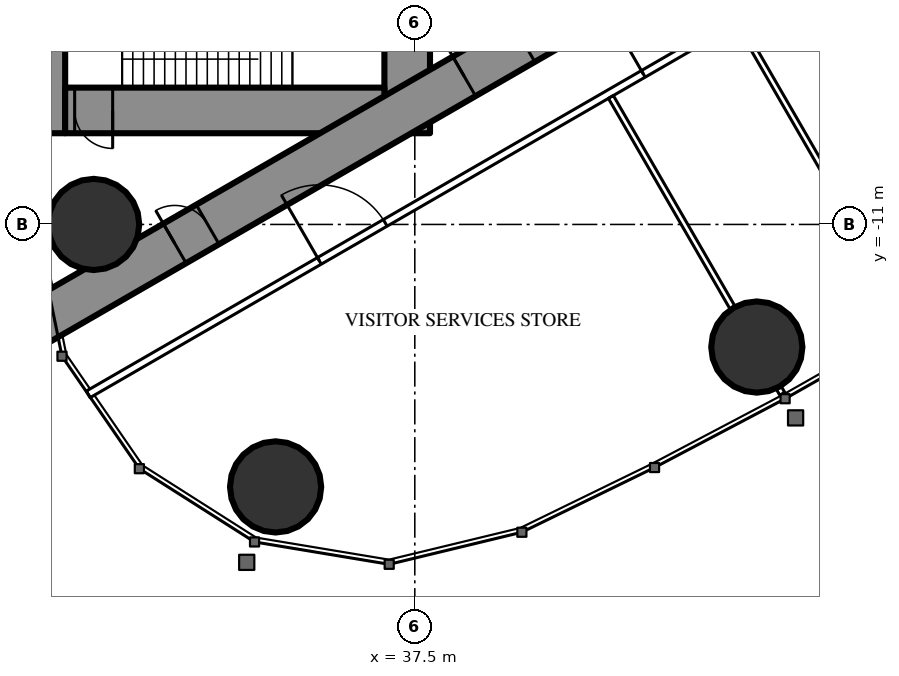
"""IFC4 building model, lengths in metres.
Left out: names, types, materials, properties, quantities, classifications, styles, units other than length and angle.
Written with IfcOpenShell. Run it as: python <this file> out.ifc"""

import sys

from ifc_helpers import new_model, si_unit, direction, frame, frame_2d, origin, origin_2d, place, context, subcontext, project, spatial, rectangle, circle, extrude, element, fill, save


model = new_model("IFC4")
c1 = context("Model", 3, precision=1e-05, world=origin(), true_north=direction((0.0, 1.0)))
c2 = subcontext(c1, "Body", "Model", "MODEL_VIEW")
j1 = project(units=[si_unit("LENGTHUNIT", "METRE"), si_unit("PLANEANGLEUNIT", "RADIAN")], contexts=[c1])
p1 = place(None, origin())
s1 = spatial("IfcSite", under=j1, at=p1, CompositionType="ELEMENT")
p2 = place(p1, origin())
s2 = spatial("IfcBuilding", under=s1, at=p2, CompositionType="ELEMENT")
p3 = place(p2, frame((0.0, 0.0, 257.3)))
s3 = spatial("IfcBuildingStorey", under=s2, at=p3, CompositionType="ELEMENT", Elevation=257.3)
for number, where, z_axis, x_axis in (
    (1, (33.837, -17.906, 0.0), (0.0, 0.0, 1.0), (1.0, 0.0, 0.0)),
    (2, (29.05, -11.0, 0.0), (0.0, 0.0, 1.0), (1.0, 0.0, 0.0)),
    (3, (46.499, -14.226, 0.0), (0.0, 0.0, 1.0), (1.0, 0.0, 0.0)),
):
    element("IfcColumn", number, at=place(p3, frame(where, z_axis=z_axis, x_axis=x_axis)), inside=s3, PredefinedType="COLUMN", context=c2, shape_type="SweptSolid", body=[
        extrude(circle(Radius=1.2, at=origin_2d()), origin(), (0.0, 0.0, 1.0), 6.0),
    ])
p4 = place(p3, frame((27.9, -8.6, 0.0), z_axis=(0.0, 0.0, 1.0), x_axis=(0.0, 1.0, 0.0)))
e4 = element("IfcWall", 4, at=p4, inside=s3, PredefinedType="SHEAR", context=c2, shape_type="SweptSolid", body=[
    extrude(rectangle(XDim=17.2, YDim=0.8, at=frame_2d((8.6, 0.0))), origin(), (0.0, 0.0, 1.0), 6.0),
])
p5 = place(p4, frame((9.35, 0.0, 0.0)))
e5 = element("IfcOpeningElement", 5, at=p5, cuts=e4, PredefinedType="OPENING", context=c2, shape_type="SweptSolid", body=[
    extrude(rectangle(XDim=0.9, YDim=2.2, at=frame_2d((0.45, 1.1))), frame((0.0, 0.41, 0.0), z_axis=(0.0, -1.0, 0.0), x_axis=(1.0, 0.0, 0.0)), (0.0, 0.0, 1.0), 0.82),
])
p6 = place(p3, frame((37.3, -8.6, 0.0), z_axis=(0.0, 0.0, 1.0), x_axis=(0.0, 1.0, 0.0)))
e6 = element("IfcWall", 6, at=p6, inside=s3, PredefinedType="SHEAR", context=c2, shape_type="SweptSolid", body=[
    extrude(rectangle(XDim=17.2, YDim=1.2, at=frame_2d((8.6, 0.0))), origin(), (0.0, 0.0, 1.0), 6.0),
])
p7 = place(p6, frame((7.7, 0.0, 0.0)))
e7 = element("IfcOpeningElement", 7, at=p7, cuts=e6, PredefinedType="OPENING", context=c2, shape_type="SweptSolid", body=[
    extrude(rectangle(XDim=1.8, YDim=2.2, at=frame_2d((0.9, 1.1))), frame((0.0, 0.61, 0.0), z_axis=(0.0, -1.0, 0.0), x_axis=(1.0, 0.0, 0.0)), (0.0, 0.0, 1.0), 1.22),
])
p8 = place(p3, frame((28.3, -8.0, 0.0), z_axis=(0.0, 0.0, 1.0), x_axis=(1.0, 0.0, 0.0)))
e8 = element("IfcWall", 8, at=p8, inside=s3, PredefinedType="SHEAR", context=c2, shape_type="SweptSolid", body=[
    extrude(rectangle(XDim=8.4, YDim=1.2, at=frame_2d((4.2, 0.0))), origin(), (0.0, 0.0, 1.0), 6.0),
])
p9 = place(p8, frame((0.25, 0.0, 0.0)))
e9 = element("IfcOpeningElement", 9, at=p9, cuts=e8, PredefinedType="OPENING", context=c2, shape_type="SweptSolid", body=[
    extrude(rectangle(XDim=1.0, YDim=2.2, at=frame_2d((0.5, 1.1))), frame((0.0, 0.61, 0.0), z_axis=(0.0, -1.0, 0.0), x_axis=(1.0, 0.0, 0.0)), (0.0, 0.0, 1.0), 1.22),
])
p10 = place(p3, frame((27.2, -13.8, 0.0), z_axis=(0.0, 0.0, 1.0), x_axis=(0.866027159892, 0.499996958321, 0.0)))
e10 = element("IfcWall", 10, at=p10, inside=s3, PredefinedType="SHEAR", context=c2, shape_type="SweptSolid", body=[
    extrude(rectangle(XDim=27.947, YDim=1.2, at=frame_2d((13.973, 0.0))), origin(), (0.0, 0.0, 1.0), 6.0),
])
p11 = place(p10, frame((4.6, 0.0, 0.0)))
e11 = element("IfcOpeningElement", 11, at=p11, cuts=e10, PredefinedType="OPENING", context=c2, shape_type="SweptSolid", body=[
    extrude(rectangle(XDim=1.0, YDim=2.2, at=frame_2d((0.5, 1.1))), frame((0.0, 0.61, 0.0), z_axis=(0.0, -1.0, 0.0), x_axis=(1.0, 0.0, 0.0)), (0.0, 0.0, 1.0), 1.22),
])
p12 = place(p10, frame((13.395, 0.0, 0.0)))
e12 = element("IfcOpeningElement", 12, at=p12, cuts=e10, PredefinedType="OPENING", context=c2, shape_type="SweptSolid", body=[
    extrude(rectangle(XDim=1.8, YDim=2.2, at=frame_2d((0.9, 1.1))), frame((0.0, 0.61, 0.0), z_axis=(0.0, -1.0, 0.0), x_axis=(1.0, 0.0, 0.0)), (0.0, 0.0, 1.0), 1.22),
])
p13 = place(p3, frame((28.907, -15.47, 0.0), z_axis=(0.0, 0.0, 1.0), x_axis=(0.866023700353, 0.500002950419, 0.0)))
e13 = element("IfcWall", 13, at=p13, inside=s3, PredefinedType="PARTITIONING", context=c2, shape_type="SweptSolid", body=[
    extrude(rectangle(XDim=30.941, YDim=0.2, at=frame_2d((15.47, 0.0))), origin(), (0.0, 0.0, 1.0), 5.75),
])
p14 = place(p13, frame((7.024, 0.0, 0.0)))
e14 = element("IfcOpeningElement", 14, at=p14, cuts=e13, PredefinedType="OPENING", context=c2, shape_type="SweptSolid", body=[
    extrude(rectangle(XDim=2.0, YDim=2.4, at=frame_2d((1.0, 1.2))), frame((0.0, 0.11, 0.0), z_axis=(0.0, -1.0, 0.0), x_axis=(1.0, 0.0, 0.0)), (0.0, 0.0, 1.0), 0.22),
])
p15 = place(p13, frame((16.865, 0.0, 0.0)))
e15 = element("IfcOpeningElement", 15, at=p15, cuts=e13, PredefinedType="OPENING", context=c2, shape_type="SweptSolid", body=[
    extrude(rectangle(XDim=1.8, YDim=2.2, at=frame_2d((0.9, 1.1))), frame((0.0, 0.11, 0.0), z_axis=(0.0, -1.0, 0.0), x_axis=(1.0, 0.0, 0.0)), (0.0, 0.0, 1.0), 0.22),
])
p16 = place(p13, frame((20.748, 0.0, 0.0)))
e16 = element("IfcOpeningElement", 16, at=p16, cuts=e13, PredefinedType="OPENING", context=c2, shape_type="SweptSolid", body=[
    extrude(rectangle(XDim=1.8, YDim=2.2, at=frame_2d((0.9, 1.1))), frame((0.0, 0.11, 0.0), z_axis=(0.0, -1.0, 0.0), x_axis=(1.0, 0.0, 0.0)), (0.0, 0.0, 1.0), 0.22),
])
p17 = place(p13, frame((26.152, 0.0, 0.0)))
e17 = element("IfcOpeningElement", 17, at=p17, cuts=e13, PredefinedType="OPENING", context=c2, shape_type="SweptSolid", body=[
    extrude(rectangle(XDim=2.0, YDim=2.4, at=frame_2d((1.0, 1.2))), frame((0.0, 0.11, 0.0), z_axis=(0.0, -1.0, 0.0), x_axis=(1.0, 0.0, 0.0)), (0.0, 0.0, 1.0), 0.22),
])
p18 = place(p3, frame((42.66, -7.646, 0.0), z_axis=(0.0, 0.0, 1.0), x_axis=(0.499996592859, -0.866027370889, 0.0)))
e18 = element("IfcWall", 18, at=p18, inside=s3, PredefinedType="PARTITIONING", context=c2, shape_type="SweptSolid", body=[
    extrude(rectangle(XDim=6.398, YDim=0.15, at=frame_2d((3.199, 0.0))), origin(), (0.0, 0.0, 1.0), 4.85),
])
p19 = place(p3, frame((47.079, -15.3, 0.0), z_axis=(0.0, 0.0, 1.0), x_axis=(0.499212083968, -0.866479829667, 0.0)))
e19 = element("IfcWall", 19, at=p19, inside=s3, PredefinedType="PARTITIONING", context=c2, shape_type="SweptSolid", body=[
    extrude(rectangle(XDim=0.179, YDim=0.15, at=frame_2d((0.09, 0.0))), origin(), (0.0, 0.0, 1.0), 4.85),
])
p20 = place(p3, frame((46.023, -5.704, 0.0), z_axis=(0.0, 0.0, 1.0), x_axis=(0.499984478165, -0.866034365135, 0.0)))
e20 = element("IfcWall", 20, at=p20, inside=s3, PredefinedType="PARTITIONING", context=c2, shape_type="SweptSolid", body=[
    extrude(rectangle(XDim=6.426, YDim=0.15, at=frame_2d((3.213, 0.0))), origin(), (0.0, 0.0, 1.0), 4.85),
])
p21 = place(p14, origin())
e21 = element("IfcDoor", 21, at=p21, inside=s3, OperationType="DOUBLE_DOOR_SINGLE_SWING", PredefinedType="DOOR", context=c2, shape_type="SweptSolid", body=[
    extrude(rectangle(XDim=2.0, YDim=2.4, at=frame_2d((1.0, 1.2))), frame((0.0, 0.025, 0.0), z_axis=(0.0, -1.0, 0.0), x_axis=(1.0, 0.0, 0.0)), (0.0, 0.0, 1.0), 0.05),
])
fill(e14, e21)
p22 = place(p15, origin())
e22 = element("IfcDoor", 22, at=p22, inside=s3, OperationType="DOUBLE_DOOR_SINGLE_SWING", PredefinedType="DOOR", context=c2, shape_type="SweptSolid", body=[
    extrude(rectangle(XDim=1.8, YDim=2.2, at=frame_2d((0.9, 1.1))), frame((0.0, 0.025, 0.0), z_axis=(0.0, -1.0, 0.0), x_axis=(1.0, 0.0, 0.0)), (0.0, 0.0, 1.0), 0.05),
])
fill(e15, e22)
p23 = place(p11, origin())
e23 = element("IfcDoor", 23, at=p23, inside=s3, OperationType="SINGLE_SWING_LEFT", PredefinedType="DOOR", context=c2, shape_type="SweptSolid", body=[
    extrude(rectangle(XDim=1.0, YDim=2.2, at=frame_2d((0.5, 1.1))), frame((0.0, 0.025, 0.0), z_axis=(0.0, -1.0, 0.0), x_axis=(1.0, 0.0, 0.0)), (0.0, 0.0, 1.0), 0.05),
])
fill(e11, e23)
p24 = place(p12, origin())
e24 = element("IfcDoor", 24, at=p24, inside=s3, OperationType="DOUBLE_DOOR_SINGLE_SWING", PredefinedType="DOOR", context=c2, shape_type="SweptSolid", body=[
    extrude(rectangle(XDim=1.8, YDim=2.2, at=frame_2d((0.9, 1.1))), frame((0.0, 0.025, 0.0), z_axis=(0.0, -1.0, 0.0), x_axis=(1.0, 0.0, 0.0)), (0.0, 0.0, 1.0), 0.05),
])
fill(e12, e24)
p25 = place(p9, origin())
e25 = element("IfcDoor", 25, at=p25, inside=s3, OperationType="SINGLE_SWING_RIGHT", PredefinedType="DOOR", context=c2, shape_type="SweptSolid", body=[
    extrude(rectangle(XDim=1.0, YDim=2.2, at=frame_2d((0.5, 1.1))), frame((0.0, 0.025, 0.0), z_axis=(0.0, -1.0, 0.0), x_axis=(1.0, 0.0, 0.0)), (0.0, 0.0, 1.0), 0.05),
])
fill(e9, e25)
save(model, sys.argv[1])
